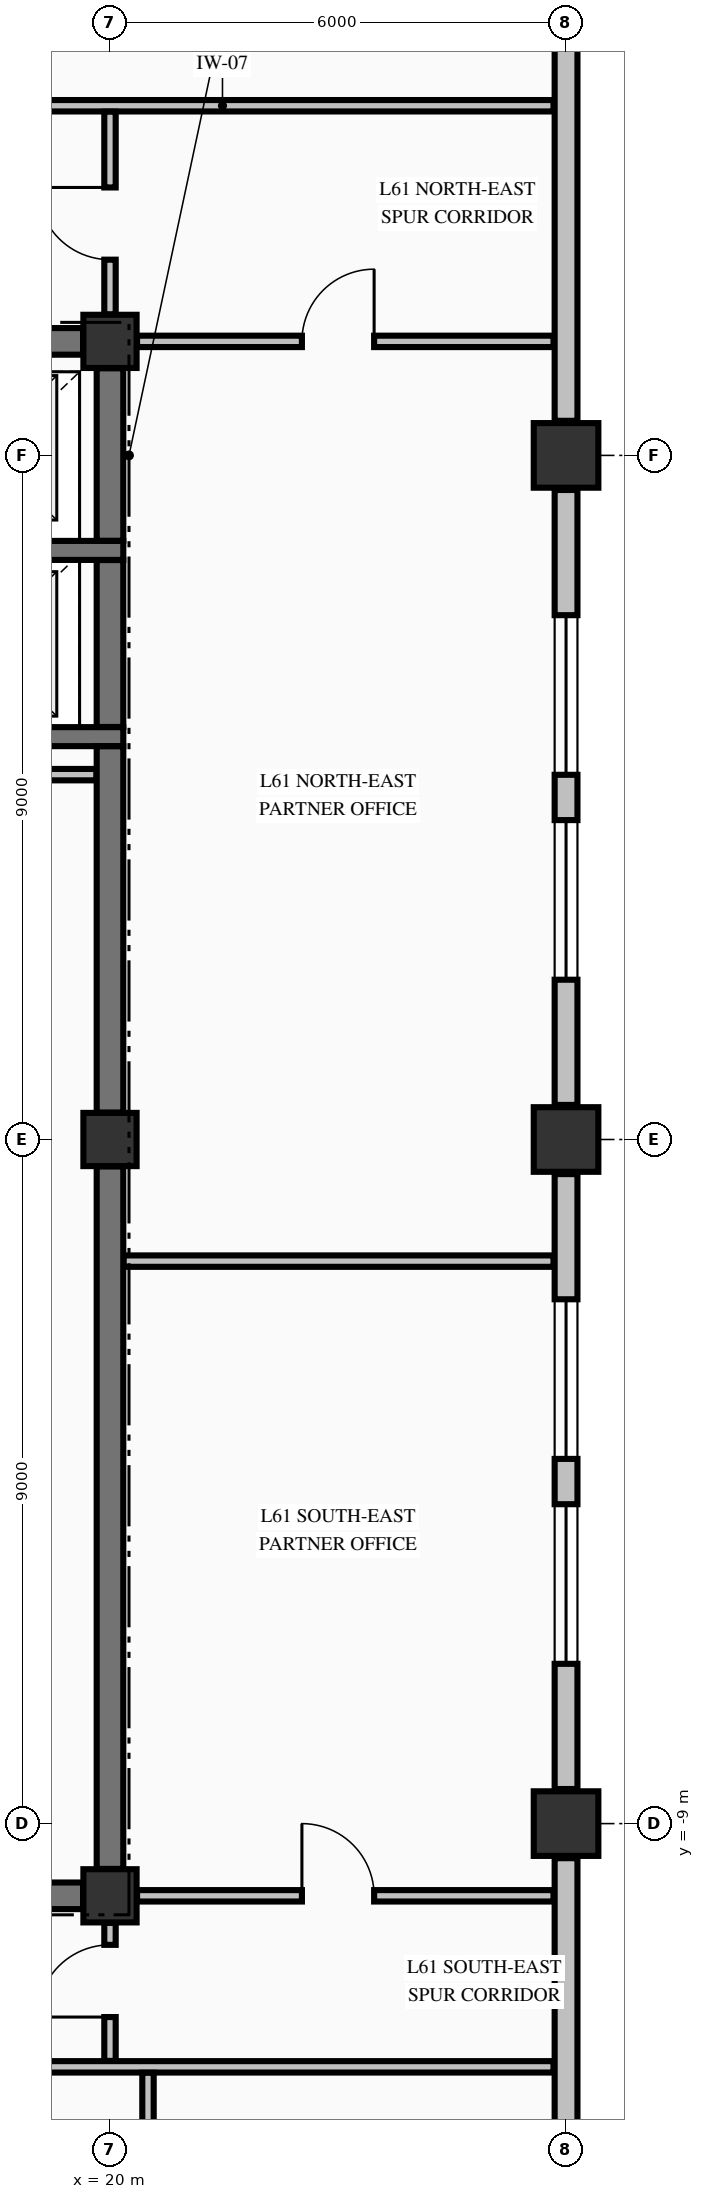
"""IFC4 building model, lengths in metres.
Left out: names, types, materials, properties, quantities, classifications, styles, units other than length and angle.
Written with IfcOpenShell. Run it as: python <this file> out.ifc"""

import sys

from ifc_helpers import new_model, si_unit, direction, frame, frame_2d, origin, origin_2d, place, context, subcontext, project, spatial, rectangle, extrude, element, fill, save


model = new_model("IFC4")
c1 = context("Model", 3, precision=1e-05, world=origin(), true_north=direction((0.0, 1.0)))
c2 = subcontext(c1, "Body", "Model", "MODEL_VIEW")
j1 = project(units=[si_unit("LENGTHUNIT", "METRE"), si_unit("PLANEANGLEUNIT", "RADIAN")], contexts=[c1])
p1 = place(None, origin())
s1 = spatial("IfcSite", under=j1, at=p1, CompositionType="ELEMENT")
p2 = place(p1, origin())
s2 = spatial("IfcBuilding", under=s1, at=p2, CompositionType="ELEMENT")
p3 = place(p2, frame((0.0, 0.0, 233.28)))
s3 = spatial("IfcBuildingStorey", under=s2, at=p3, CompositionType="ELEMENT", Elevation=233.28)
for number, where, z_axis, x_axis in (
    (1, (26.0, -9.0, -0.25), (0.0, 0.0, 1.0), (1.0, 0.0, 0.0)),
    (2, (26.0, 0.0, -0.25), (0.0, 0.0, 1.0), (1.0, 0.0, 0.0)),
    (3, (26.0, 9.0, -0.25), (0.0, 0.0, 1.0), (1.0, 0.0, 0.0)),
):
    element("IfcColumn", number, at=place(p3, frame(where, z_axis=z_axis, x_axis=x_axis)), inside=s3, PredefinedType="COLUMN", context=c2, shape_type="SweptSolid", body=[
        extrude(rectangle(XDim=0.85, YDim=0.85, at=origin_2d()), origin(), (0.0, 0.0, 1.0), 3.23),
    ])
for number, where, z_axis, x_axis in (
    (4, (20.0, -9.95, -0.25), (0.0, 0.0, 1.0), (1.0, 0.0, 0.0)),
    (5, (20.0, 10.5, -0.25), (0.0, 0.0, 1.0), (1.0, 0.0, 0.0)),
    (6, (20.0, 0.0, -0.25), (0.0, 0.0, 1.0), (1.0, 0.0, 0.0)),
):
    element("IfcColumn", number, at=place(p3, frame(where, z_axis=z_axis, x_axis=x_axis)), inside=s3, PredefinedType="COLUMN", context=c2, shape_type="SweptSolid", body=[
        extrude(rectangle(XDim=0.7, YDim=0.7, at=origin_2d()), origin(), (0.0, 0.0, 1.0), 3.23),
    ])
p4 = place(p3, frame((26.0, -17.545, 0.0), z_axis=(0.0, 0.0, 1.0), x_axis=(0.0, 1.0, 0.0)))
e7 = element("IfcWall", 7, at=p4, inside=s3, PredefinedType="STANDARD", context=c2, shape_type="SweptSolid", body=[
    extrude(rectangle(XDim=8.09, YDim=0.3, at=frame_2d((4.045, 0.0))), origin(), (0.0, 0.0, 1.0), 2.372),
])
p5 = place(p3, frame((26.0, -8.545, 0.0), z_axis=(0.0, 0.0, 1.0), x_axis=(0.0, 1.0, 0.0)))
e8 = element("IfcWall", 8, at=p5, inside=s3, PredefinedType="STANDARD", context=c2, shape_type="SweptSolid", body=[
    extrude(rectangle(XDim=8.09, YDim=0.3, at=frame_2d((4.045, 0.0))), origin(), (0.0, 0.0, 1.0), 2.372),
])
p6 = place(p5, frame((1.647, 0.0, 0.7)))
e9 = element("IfcOpeningElement", 9, at=p6, cuts=e8, PredefinedType="OPENING", context=c2, shape_type="SweptSolid", body=[
    extrude(rectangle(XDim=2.1, YDim=1.5, at=frame_2d((1.05, 0.75))), frame((0.0, 0.16, 0.0), z_axis=(0.0, -1.0, 0.0), x_axis=(1.0, 0.0, 0.0)), (0.0, 0.0, 1.0), 0.32),
])
p7 = place(p5, frame((4.343, 0.0, 0.7)))
e10 = element("IfcOpeningElement", 10, at=p7, cuts=e8, PredefinedType="OPENING", context=c2, shape_type="SweptSolid", body=[
    extrude(rectangle(XDim=2.1, YDim=1.5, at=frame_2d((1.05, 0.75))), frame((0.0, 0.16, 0.0), z_axis=(0.0, -1.0, 0.0), x_axis=(1.0, 0.0, 0.0)), (0.0, 0.0, 1.0), 0.32),
])
p8 = place(p3, frame((26.0, 0.455, 0.0), z_axis=(0.0, 0.0, 1.0), x_axis=(0.0, 1.0, 0.0)))
e11 = element("IfcWall", 11, at=p8, inside=s3, PredefinedType="STANDARD", context=c2, shape_type="SweptSolid", body=[
    extrude(rectangle(XDim=8.09, YDim=0.3, at=frame_2d((4.045, 0.0))), origin(), (0.0, 0.0, 1.0), 2.372),
])
p9 = place(p8, frame((1.647, 0.0, 0.7)))
e12 = element("IfcOpeningElement", 12, at=p9, cuts=e11, PredefinedType="OPENING", context=c2, shape_type="SweptSolid", body=[
    extrude(rectangle(XDim=2.1, YDim=1.5, at=frame_2d((1.05, 0.75))), frame((0.0, 0.16, 0.0), z_axis=(0.0, -1.0, 0.0), x_axis=(1.0, 0.0, 0.0)), (0.0, 0.0, 1.0), 0.32),
])
p10 = place(p8, frame((4.343, 0.0, 0.7)))
e13 = element("IfcOpeningElement", 13, at=p10, cuts=e11, PredefinedType="OPENING", context=c2, shape_type="SweptSolid", body=[
    extrude(rectangle(XDim=2.1, YDim=1.5, at=frame_2d((1.05, 0.75))), frame((0.0, 0.16, 0.0), z_axis=(0.0, -1.0, 0.0), x_axis=(1.0, 0.0, 0.0)), (0.0, 0.0, 1.0), 0.32),
])
p11 = place(p3, frame((26.0, 9.455, 0.0), z_axis=(0.0, 0.0, 1.0), x_axis=(0.0, 1.0, 0.0)))
e14 = element("IfcWall", 14, at=p11, inside=s3, PredefinedType="STANDARD", context=c2, shape_type="SweptSolid", body=[
    extrude(rectangle(XDim=8.09, YDim=0.3, at=frame_2d((4.045, 0.0))), origin(), (0.0, 0.0, 1.0), 2.372),
])
p12 = place(p3, frame((14.7, -9.95, 0.0), z_axis=(0.0, 0.0, 1.0), x_axis=(1.0, 0.0, 0.0)))
e15 = element("IfcWall", 15, at=p12, inside=s3, PredefinedType="SHEAR", context=c2, shape_type="SweptSolid", body=[
    extrude(rectangle(XDim=4.946, YDim=0.35, at=frame_2d((2.473, 0.0))), origin(), (0.0, 0.0, 1.0), 2.98),
])
p13 = place(p12, frame((3.25, 0.0, 0.0)))
e16 = element("IfcOpeningElement", 16, at=p13, cuts=e15, PredefinedType="OPENING", context=c2, shape_type="SweptSolid", body=[
    extrude(rectangle(XDim=0.9, YDim=2.15, at=frame_2d((0.45, 1.075))), frame((0.0, 0.185, 0.0), z_axis=(0.0, -1.0, 0.0), x_axis=(1.0, 0.0, 0.0)), (0.0, 0.0, 1.0), 0.37),
])
p14 = place(p12, frame((0.575, 0.0, 0.0)))
e17 = element("IfcOpeningElement", 17, at=p14, cuts=e15, PredefinedType="OPENING", context=c2, shape_type="SweptSolid", body=[
    extrude(rectangle(XDim=0.95, YDim=2.15, at=frame_2d((0.475, 1.075))), frame((0.0, 0.185, 0.0), z_axis=(0.0, -1.0, 0.0), x_axis=(1.0, 0.0, 0.0)), (0.0, 0.0, 1.0), 0.37),
])
for number, where, z_axis, x_axis in (
    (18, (17.025, 5.3, 0.0), (0.0, 0.0, 1.0), (1.0, 0.0, 0.0)),
    (19, (17.025, 7.75, 0.0), (0.0, 0.0, 1.0), (1.0, 0.0, 0.0)),
):
    element("IfcWall", number, at=place(p3, frame(where, z_axis=z_axis, x_axis=x_axis)), inside=s3, PredefinedType="SOLIDWALL", context=c2, shape_type="SweptSolid", body=[
        extrude(rectangle(XDim=3.15, YDim=0.25, at=frame_2d((1.575, 0.0))), origin(), (0.0, 0.0, 1.0), 2.98),
    ])
p15 = place(p3, frame((14.7, 10.5, 0.0), z_axis=(0.0, 0.0, 1.0), x_axis=(1.0, 0.0, 0.0)))
e20 = element("IfcWall", 20, at=p15, inside=s3, PredefinedType="SHEAR", context=c2, shape_type="SweptSolid", body=[
    extrude(rectangle(XDim=4.946, YDim=0.35, at=frame_2d((2.473, 0.0))), origin(), (0.0, 0.0, 1.0), 2.98),
])
p16 = place(p15, frame((0.7, 0.0, 0.0)))
e21 = element("IfcOpeningElement", 21, at=p16, cuts=e20, PredefinedType="OPENING", context=c2, shape_type="SweptSolid", body=[
    extrude(rectangle(XDim=1.1, YDim=2.15, at=frame_2d((0.55, 1.075))), frame((0.0, 0.185, 0.0), z_axis=(0.0, -1.0, 0.0), x_axis=(1.0, 0.0, 0.0)), (0.0, 0.0, 1.0), 0.37),
])
p17 = place(p3, frame((-20.075, -12.2, 0.0), z_axis=(0.0, 0.0, 1.0), x_axis=(1.0, 0.0, 0.0)))
e22 = element("IfcWall", 22, at=p17, inside=s3, PredefinedType="PARTITIONING", context=c2, shape_type="SweptSolid", body=[
    extrude(rectangle(XDim=45.91, YDim=0.15, at=frame_2d((22.955, 0.0))), origin(), (0.0, 0.0, 1.0), 2.98),
])
p18 = place(p17, frame((9.1, 0.0, 0.0)))
e23 = element("IfcOpeningElement", 23, at=p18, cuts=e22, PredefinedType="OPENING", context=c2, shape_type="SweptSolid", body=[
    extrude(rectangle(XDim=0.95, YDim=2.15, at=frame_2d((0.475, 1.075))), frame((0.0, 0.085, 0.0), z_axis=(0.0, -1.0, 0.0), x_axis=(1.0, 0.0, 0.0)), (0.0, 0.0, 1.0), 0.17),
])
p19 = place(p17, frame((17.2, 0.0, 0.0)))
e24 = element("IfcOpeningElement", 24, at=p19, cuts=e22, PredefinedType="OPENING", context=c2, shape_type="SweptSolid", body=[
    extrude(rectangle(XDim=1.05, YDim=2.15, at=frame_2d((0.525, 1.075))), frame((0.0, 0.085, 0.0), z_axis=(0.0, -1.0, 0.0), x_axis=(1.0, 0.0, 0.0)), (0.0, 0.0, 1.0), 0.17),
])
p20 = place(p17, frame((25.35, 0.0, 0.0)))
e25 = element("IfcOpeningElement", 25, at=p20, cuts=e22, PredefinedType="OPENING", context=c2, shape_type="SweptSolid", body=[
    extrude(rectangle(XDim=1.05, YDim=2.15, at=frame_2d((0.525, 1.075))), frame((0.0, 0.085, 0.0), z_axis=(0.0, -1.0, 0.0), x_axis=(1.0, 0.0, 0.0)), (0.0, 0.0, 1.0), 0.17),
])
p21 = place(p3, frame((20.356, -9.95, 0.0), z_axis=(0.0, 0.0, 1.0), x_axis=(1.0, 0.0, 0.0)))
e26 = element("IfcWall", 26, at=p21, inside=s3, PredefinedType="PARTITIONING", context=c2, shape_type="SweptSolid", body=[
    extrude(rectangle(XDim=5.479, YDim=0.15, at=frame_2d((2.74, 0.0))), origin(), (0.0, 0.0, 1.0), 2.98),
])
p22 = place(p21, frame((2.169, 0.0, 0.0)))
e27 = element("IfcOpeningElement", 27, at=p22, cuts=e26, PredefinedType="OPENING", context=c2, shape_type="SweptSolid", body=[
    extrude(rectangle(XDim=0.95, YDim=2.15, at=frame_2d((0.475, 1.075))), frame((0.0, 0.085, 0.0), z_axis=(0.0, -1.0, 0.0), x_axis=(1.0, 0.0, 0.0)), (0.0, 0.0, 1.0), 0.17),
])
p23 = place(p3, frame((20.178, -1.6, 0.0), z_axis=(0.0, 0.0, 1.0), x_axis=(1.0, 0.0, 0.0)))
e28 = element("IfcWall", 28, at=p23, inside=s3, PredefinedType="PARTITIONING", context=c2, shape_type="SweptSolid", body=[
    extrude(rectangle(XDim=5.657, YDim=0.15, at=frame_2d((2.829, 0.0))), origin(), (0.0, 0.0, 1.0), 2.98),
])
p24 = place(p3, frame((14.878, 4.8, 0.0), z_axis=(0.0, 0.0, 1.0), x_axis=(1.0, 0.0, 0.0)))
e29 = element("IfcWall", 29, at=p24, inside=s3, PredefinedType="PARTITIONING", context=c2, shape_type="SweptSolid", body=[
    extrude(rectangle(XDim=4.944, YDim=0.15, at=frame_2d((2.472, 0.0))), origin(), (0.0, 0.0, 1.0), 2.98),
])
p25 = place(p3, frame((20.356, 10.5, 0.0), z_axis=(0.0, 0.0, 1.0), x_axis=(1.0, 0.0, 0.0)))
e30 = element("IfcWall", 30, at=p25, inside=s3, PredefinedType="PARTITIONING", context=c2, shape_type="SweptSolid", body=[
    extrude(rectangle(XDim=5.479, YDim=0.15, at=frame_2d((2.74, 0.0))), origin(), (0.0, 0.0, 1.0), 2.98),
])
p26 = place(p25, frame((2.169, 0.0, 0.0)))
e31 = element("IfcOpeningElement", 31, at=p26, cuts=e30, PredefinedType="OPENING", context=c2, shape_type="SweptSolid", body=[
    extrude(rectangle(XDim=0.95, YDim=2.15, at=frame_2d((0.475, 1.075))), frame((0.0, 0.085, 0.0), z_axis=(0.0, -1.0, 0.0), x_axis=(1.0, 0.0, 0.0)), (0.0, 0.0, 1.0), 0.17),
])
p27 = place(p3, frame((-20.075, 13.6, 0.0), z_axis=(0.0, 0.0, 1.0), x_axis=(1.0, 0.0, 0.0)))
e32 = element("IfcWall", 32, at=p27, inside=s3, PredefinedType="PARTITIONING", context=c2, shape_type="SweptSolid", body=[
    extrude(rectangle(XDim=45.91, YDim=0.15, at=frame_2d((22.955, 0.0))), origin(), (0.0, 0.0, 1.0), 2.98),
])
p28 = place(p27, frame((6.6, 0.0, 0.0)))
e33 = element("IfcOpeningElement", 33, at=p28, cuts=e32, PredefinedType="OPENING", context=c2, shape_type="SweptSolid", body=[
    extrude(rectangle(XDim=0.95, YDim=2.15, at=frame_2d((0.475, 1.075))), frame((0.0, 0.085, 0.0), z_axis=(0.0, -1.0, 0.0), x_axis=(1.0, 0.0, 0.0)), (0.0, 0.0, 1.0), 0.17),
])
p29 = place(p27, frame((12.0, 0.0, 0.0)))
e34 = element("IfcOpeningElement", 34, at=p29, cuts=e32, PredefinedType="OPENING", context=c2, shape_type="SweptSolid", body=[
    extrude(rectangle(XDim=0.95, YDim=2.15, at=frame_2d((0.475, 1.075))), frame((0.0, 0.085, 0.0), z_axis=(0.0, -1.0, 0.0), x_axis=(1.0, 0.0, 0.0)), (0.0, 0.0, 1.0), 0.17),
])
p30 = place(p27, frame((17.9, 0.0, 0.0)))
e35 = element("IfcOpeningElement", 35, at=p30, cuts=e32, PredefinedType="OPENING", context=c2, shape_type="SweptSolid", body=[
    extrude(rectangle(XDim=0.95, YDim=2.15, at=frame_2d((0.475, 1.075))), frame((0.0, 0.085, 0.0), z_axis=(0.0, -1.0, 0.0), x_axis=(1.0, 0.0, 0.0)), (0.0, 0.0, 1.0), 0.17),
])
p31 = place(p27, frame((24.0, 0.0, 0.0)))
e36 = element("IfcOpeningElement", 36, at=p31, cuts=e32, PredefinedType="OPENING", context=c2, shape_type="SweptSolid", body=[
    extrude(rectangle(XDim=0.95, YDim=2.15, at=frame_2d((0.475, 1.075))), frame((0.0, 0.085, 0.0), z_axis=(0.0, -1.0, 0.0), x_axis=(1.0, 0.0, 0.0)), (0.0, 0.0, 1.0), 0.17),
])
p32 = place(p27, frame((31.45, 0.0, 0.0)))
e37 = element("IfcOpeningElement", 37, at=p32, cuts=e32, PredefinedType="OPENING", context=c2, shape_type="SweptSolid", body=[
    extrude(rectangle(XDim=0.95, YDim=2.15, at=frame_2d((0.475, 1.075))), frame((0.0, 0.085, 0.0), z_axis=(0.0, -1.0, 0.0), x_axis=(1.0, 0.0, 0.0)), (0.0, 0.0, 1.0), 0.17),
])
p33 = place(p27, frame((36.25, 0.0, 0.0)))
e38 = element("IfcOpeningElement", 38, at=p33, cuts=e32, PredefinedType="OPENING", context=c2, shape_type="SweptSolid", body=[
    extrude(rectangle(XDim=0.95, YDim=2.15, at=frame_2d((0.475, 1.075))), frame((0.0, 0.085, 0.0), z_axis=(0.0, -1.0, 0.0), x_axis=(1.0, 0.0, 0.0)), (0.0, 0.0, 1.0), 0.17),
])
p34 = place(p3, frame((20.0, -9.596, 0.0), z_axis=(0.0, 0.0, 1.0), x_axis=(0.0, 1.0, 0.0)))
e39 = element("IfcWall", 39, at=p34, inside=s3, PredefinedType="SHEAR", context=c2, shape_type="SweptSolid", body=[
    extrude(rectangle(XDim=9.242, YDim=0.35, at=frame_2d((4.621, 0.0))), origin(), (0.0, 0.0, 1.0), 2.98),
])
p35 = place(p3, frame((20.0, 0.354, 0.0), z_axis=(0.0, 0.0, 1.0), x_axis=(0.0, 1.0, 0.0)))
e40 = element("IfcWall", 40, at=p35, inside=s3, PredefinedType="SHEAR", context=c2, shape_type="SweptSolid", body=[
    extrude(rectangle(XDim=4.819, YDim=0.35, at=frame_2d((2.41, 0.0))), origin(), (0.0, 0.0, 1.0), 2.98),
])
p36 = place(p3, frame((20.0, 5.427, 0.0), z_axis=(0.0, 0.0, 1.0), x_axis=(0.0, 1.0, 0.0)))
e41 = element("IfcWall", 41, at=p36, inside=s3, PredefinedType="SHEAR", context=c2, shape_type="SweptSolid", body=[
    extrude(rectangle(XDim=2.196, YDim=0.35, at=frame_2d((1.098, 0.0))), origin(), (0.0, 0.0, 1.0), 2.98),
])
p37 = place(p3, frame((20.0, 7.877, 0.0), z_axis=(0.0, 0.0, 1.0), x_axis=(0.0, 1.0, 0.0)))
e42 = element("IfcWall", 42, at=p37, inside=s3, PredefinedType="SHEAR", context=c2, shape_type="SweptSolid", body=[
    extrude(rectangle(XDim=2.269, YDim=0.35, at=frame_2d((1.135, 0.0))), origin(), (0.0, 0.0, 1.0), 2.98),
])
p38 = place(p3, frame((20.0, -12.122, 0.0), z_axis=(0.0, 0.0, 1.0), x_axis=(0.0, 1.0, 0.0)))
e43 = element("IfcWall", 43, at=p38, inside=s3, PredefinedType="PARTITIONING", context=c2, shape_type="SweptSolid", body=[
    extrude(rectangle(XDim=1.816, YDim=0.15, at=frame_2d((0.908, 0.0))), origin(), (0.0, 0.0, 1.0), 2.98),
])
p39 = place(p38, frame((0.577, 0.0, 0.0)))
e44 = element("IfcOpeningElement", 44, at=p39, cuts=e43, PredefinedType="OPENING", context=c2, shape_type="SweptSolid", body=[
    extrude(rectangle(XDim=0.95, YDim=2.15, at=frame_2d((0.475, 1.075))), frame((0.0, 0.085, 0.0), z_axis=(0.0, -1.0, 0.0), x_axis=(1.0, 0.0, 0.0)), (0.0, 0.0, 1.0), 0.17),
])
p40 = place(p3, frame((20.0, 10.856, 0.0), z_axis=(0.0, 0.0, 1.0), x_axis=(0.0, 1.0, 0.0)))
e45 = element("IfcWall", 45, at=p40, inside=s3, PredefinedType="PARTITIONING", context=c2, shape_type="SweptSolid", body=[
    extrude(rectangle(XDim=2.666, YDim=0.15, at=frame_2d((1.333, 0.0))), origin(), (0.0, 0.0, 1.0), 2.98),
])
p41 = place(p40, frame((0.719, 0.0, 0.0)))
e46 = element("IfcOpeningElement", 46, at=p41, cuts=e45, PredefinedType="OPENING", context=c2, shape_type="SweptSolid", body=[
    extrude(rectangle(XDim=0.95, YDim=2.15, at=frame_2d((0.475, 1.075))), frame((0.0, 0.085, 0.0), z_axis=(0.0, -1.0, 0.0), x_axis=(1.0, 0.0, 0.0)), (0.0, 0.0, 1.0), 0.17),
])
p42 = place(p3, frame((20.5, -17.569, 0.0), z_axis=(0.0, 0.0, 1.0), x_axis=(0.0, 1.0, 0.0)))
e47 = element("IfcWall", 47, at=p42, inside=s3, PredefinedType="PARTITIONING", context=c2, shape_type="SweptSolid", body=[
    extrude(rectangle(XDim=5.291, YDim=0.15, at=frame_2d((2.646, 0.0))), origin(), (0.0, 0.0, 1.0), 2.98),
])
p43 = place(p6, origin())
e48 = element("IfcWindow", 48, at=p43, inside=s3, PartitioningType="SINGLE_PANEL", PredefinedType="WINDOW", context=c2, shape_type="SweptSolid", body=[
    extrude(rectangle(XDim=2.1, YDim=1.5, at=frame_2d((1.05, 0.75))), frame((0.0, 0.03, 0.0), z_axis=(0.0, -1.0, 0.0), x_axis=(1.0, 0.0, 0.0)), (0.0, 0.0, 1.0), 0.06),
])
fill(e9, e48)
p44 = place(p7, origin())
e49 = element("IfcWindow", 49, at=p44, inside=s3, PartitioningType="SINGLE_PANEL", PredefinedType="WINDOW", context=c2, shape_type="SweptSolid", body=[
    extrude(rectangle(XDim=2.1, YDim=1.5, at=frame_2d((1.05, 0.75))), frame((0.0, 0.03, 0.0), z_axis=(0.0, -1.0, 0.0), x_axis=(1.0, 0.0, 0.0)), (0.0, 0.0, 1.0), 0.06),
])
fill(e10, e49)
p45 = place(p9, origin())
e50 = element("IfcWindow", 50, at=p45, inside=s3, PartitioningType="SINGLE_PANEL", PredefinedType="WINDOW", context=c2, shape_type="SweptSolid", body=[
    extrude(rectangle(XDim=2.1, YDim=1.5, at=frame_2d((1.05, 0.75))), frame((0.0, 0.03, 0.0), z_axis=(0.0, -1.0, 0.0), x_axis=(1.0, 0.0, 0.0)), (0.0, 0.0, 1.0), 0.06),
])
fill(e12, e50)
p46 = place(p10, origin())
e51 = element("IfcWindow", 51, at=p46, inside=s3, PartitioningType="SINGLE_PANEL", PredefinedType="WINDOW", context=c2, shape_type="SweptSolid", body=[
    extrude(rectangle(XDim=2.1, YDim=1.5, at=frame_2d((1.05, 0.75))), frame((0.0, 0.03, 0.0), z_axis=(0.0, -1.0, 0.0), x_axis=(1.0, 0.0, 0.0)), (0.0, 0.0, 1.0), 0.06),
])
fill(e13, e51)
p47 = place(p41, origin())
e52 = element("IfcDoor", 52, at=p47, inside=s3, OperationType="SINGLE_SWING_RIGHT", PredefinedType="DOOR", context=c2, shape_type="SweptSolid", body=[
    extrude(rectangle(XDim=0.95, YDim=2.15, at=frame_2d((0.475, 1.075))), frame((0.0, 0.025, 0.0), z_axis=(0.0, -1.0, 0.0), x_axis=(1.0, 0.0, 0.0)), (0.0, 0.0, 1.0), 0.05),
])
fill(e46, e52)
p48 = place(p39, origin())
e53 = element("IfcDoor", 53, at=p48, inside=s3, OperationType="SINGLE_SWING_LEFT", PredefinedType="DOOR", context=c2, shape_type="SweptSolid", body=[
    extrude(rectangle(XDim=0.95, YDim=2.15, at=frame_2d((0.475, 1.075))), frame((0.0, 0.025, 0.0), z_axis=(0.0, -1.0, 0.0), x_axis=(1.0, 0.0, 0.0)), (0.0, 0.0, 1.0), 0.05),
])
fill(e44, e53)
p49 = place(p26, origin())
e54 = element("IfcDoor", 54, at=p49, inside=s3, OperationType="SINGLE_SWING_RIGHT", PredefinedType="DOOR", context=c2, shape_type="SweptSolid", body=[
    extrude(rectangle(XDim=0.95, YDim=2.15, at=frame_2d((0.475, 1.075))), frame((0.0, 0.025, 0.0), z_axis=(0.0, -1.0, 0.0), x_axis=(1.0, 0.0, 0.0)), (0.0, 0.0, 1.0), 0.05),
])
fill(e31, e54)
p50 = place(p22, origin())
e55 = element("IfcDoor", 55, at=p50, inside=s3, OperationType="SINGLE_SWING_LEFT", PredefinedType="DOOR", context=c2, shape_type="SweptSolid", body=[
    extrude(rectangle(XDim=0.95, YDim=2.15, at=frame_2d((0.475, 1.075))), frame((0.0, 0.025, 0.0), z_axis=(0.0, -1.0, 0.0), x_axis=(1.0, 0.0, 0.0)), (0.0, 0.0, 1.0), 0.05),
])
fill(e27, e55)
save(model, sys.argv[1])
